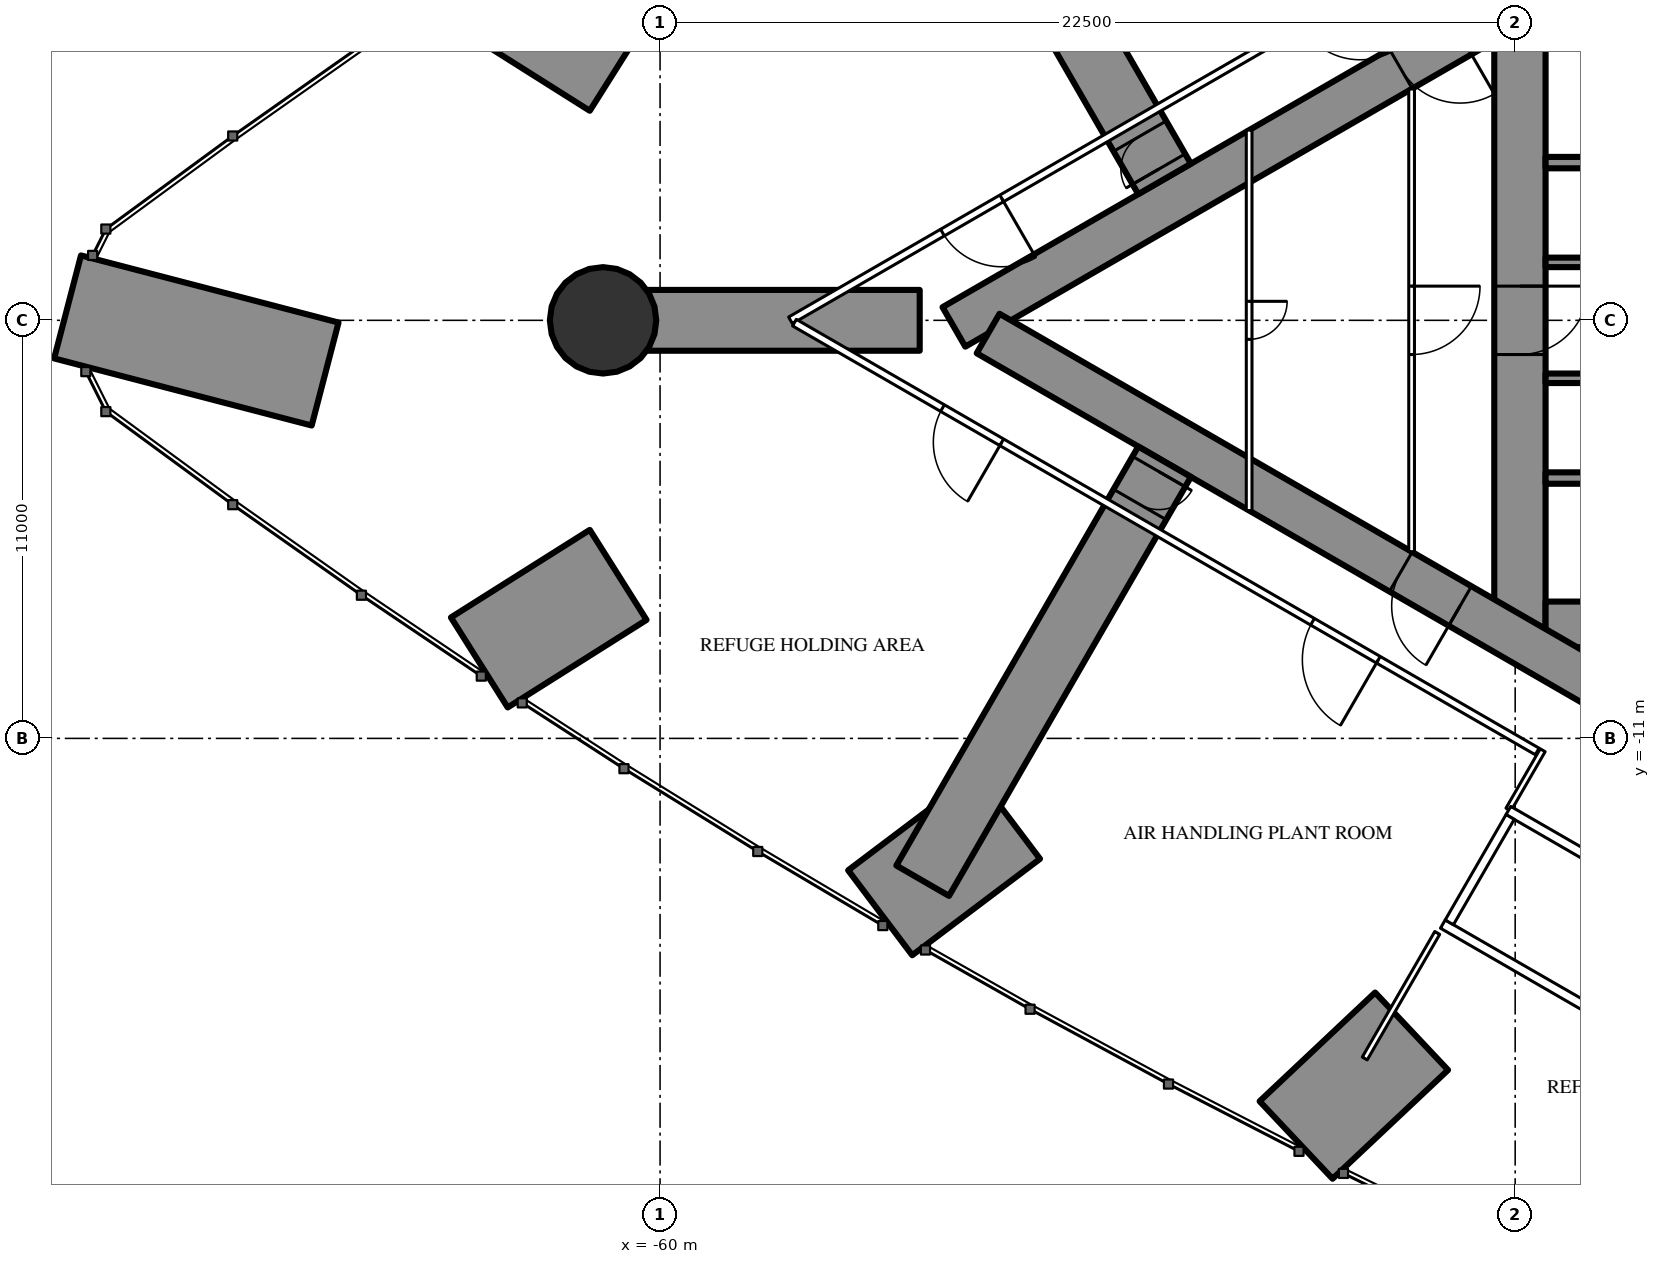
"""IFC4 building model, lengths in metres.
Left out: names, types, materials, properties, quantities, classifications, styles, units other than length and angle.
Written with IfcOpenShell. Run it as: python <this file> out.ifc"""

import sys

from ifc_helpers import new_model, si_unit, direction, frame, frame_2d, origin, origin_2d, place, context, subcontext, project, spatial, rectangle, hollow_circle, extrude, element, fill, save


model = new_model("IFC4")
c1 = context("Model", 3, precision=1e-05, world=origin(), true_north=direction((0.0, 1.0)))
c2 = subcontext(c1, "Body", "Model", "MODEL_VIEW")
j1 = project(units=[si_unit("LENGTHUNIT", "METRE"), si_unit("PLANEANGLEUNIT", "RADIAN")], contexts=[c1])
p1 = place(None, origin())
s1 = spatial("IfcSite", under=j1, at=p1, CompositionType="ELEMENT")
p2 = place(p1, origin())
s2 = spatial("IfcBuilding", under=s1, at=p2, CompositionType="ELEMENT")
p3 = place(p2, frame((0.0, 0.0, 81.0)))
s3 = spatial("IfcBuildingStorey", under=s2, at=p3, CompositionType="ELEMENT", Elevation=81.0)
p4 = place(p3, frame((-75.59, 0.353, 0.0), z_axis=(0.0, 0.0, 1.0), x_axis=(0.967676481034, -0.252194821623, 0.0)))
e1 = element("IfcWall", 1, at=p4, inside=s3, PredefinedType="SHEAR", context=c2, shape_type="SweptSolid", body=[
    extrude(rectangle(XDim=7.003, YDim=2.8, at=frame_2d((3.501, 0.0))), origin(), (0.0, 0.0, 1.0), 6.0),
])
p5 = place(p3, frame((-64.756, -9.002, 0.0), z_axis=(0.0, 0.0, 1.0), x_axis=(0.845851319887, 0.533418732934, 0.0)))
e2 = element("IfcWall", 2, at=p5, inside=s3, PredefinedType="SHEAR", context=c2, shape_type="SweptSolid", body=[
    extrude(rectangle(XDim=4.32, YDim=2.8, at=frame_2d((2.16, 0.0))), origin(), (0.0, 0.0, 1.0), 6.0),
])
p6 = place(p3, frame((-54.208, -15.588, 0.0), z_axis=(0.0, 0.0, 1.0), x_axis=(0.798432065831, 0.602084907843, 0.0)))
e3 = element("IfcWall", 3, at=p6, inside=s3, PredefinedType="SHEAR", context=c2, shape_type="SweptSolid", body=[
    extrude(rectangle(XDim=4.211, YDim=2.8, at=frame_2d((2.106, 0.0))), origin(), (0.0, 0.0, 1.0), 6.0),
])
p7 = place(p3, frame((-43.265, -21.567, 0.0), z_axis=(0.0, 0.0, 1.0), x_axis=(0.728105540353, 0.685465040762, 0.0)))
e4 = element("IfcWall", 4, at=p7, inside=s3, PredefinedType="SHEAR", context=c2, shape_type="SweptSolid", body=[
    extrude(rectangle(XDim=4.174, YDim=2.8, at=frame_2d((2.087, 0.0))), origin(), (0.0, 0.0, 1.0), 6.0),
])
p8 = place(p3, frame((-64.756, 9.002, 0.0), z_axis=(0.0, 0.0, 1.0), x_axis=(0.845851319887, -0.533418732934, 0.0)))
e5 = element("IfcWall", 5, at=p8, inside=s3, PredefinedType="SHEAR", context=c2, shape_type="SweptSolid", body=[
    extrude(rectangle(XDim=4.32, YDim=2.8, at=frame_2d((2.16, 0.0))), origin(), (0.0, 0.0, 1.0), 6.0),
])
p9 = place(p3, frame((-61.5, 0.0, 0.0), z_axis=(0.0, 0.0, 1.0), x_axis=(1.0, 0.0, 0.0)))
e6 = element("IfcColumn", 6, at=p9, inside=s3, PredefinedType="COLUMN", context=c2, shape_type="SweptSolid", body=[
    extrude(hollow_circle(Radius=1.4, WallThickness=0.1, at=origin_2d()), origin(), (0.0, 0.0, 1.0), 6.0),
])
p10 = place(p3, frame((-37.375, 8.6, 0.0), z_axis=(0.0, 0.0, 1.0), x_axis=(0.0, -1.0, 0.0)))
e7 = element("IfcWall", 7, at=p10, inside=s3, PredefinedType="SHEAR", context=c2, shape_type="SweptSolid", body=[
    extrude(rectangle(XDim=17.2, YDim=1.35, at=frame_2d((8.6, 0.0))), origin(), (0.0, 0.0, 1.0), 6.0),
])
p11 = place(p10, frame((7.7, 0.0, 0.0)))
e8 = element("IfcOpeningElement", 8, at=p11, cuts=e7, PredefinedType="OPENING", context=c2, shape_type="SweptSolid", body=[
    extrude(rectangle(XDim=1.8, YDim=2.2, at=frame_2d((0.9, 1.1))), frame((0.0, 0.685, 0.0), z_axis=(0.0, -1.0, 0.0), x_axis=(1.0, 0.0, 0.0)), (0.0, 0.0, 1.0), 1.37),
])
p12 = place(p3, frame((-28.3, -8.0, 0.0), z_axis=(0.0, 0.0, 1.0), x_axis=(-1.0, 0.0, 0.0)))
e9 = element("IfcWall", 9, at=p12, inside=s3, PredefinedType="SHEAR", context=c2, shape_type="SweptSolid", body=[
    extrude(rectangle(XDim=8.4, YDim=1.2, at=frame_2d((4.2, 0.0))), origin(), (0.0, 0.0, 1.0), 6.0),
])
p13 = place(p12, frame((0.25, 0.0, 0.0)))
e10 = element("IfcOpeningElement", 10, at=p13, cuts=e9, PredefinedType="OPENING", context=c2, shape_type="SweptSolid", body=[
    extrude(rectangle(XDim=1.0, YDim=2.2, at=frame_2d((0.5, 1.1))), frame((0.0, 0.61, 0.0), z_axis=(0.0, -1.0, 0.0), x_axis=(1.0, 0.0, 0.0)), (0.0, 0.0, 1.0), 1.22),
])
for number, where, z_axis, x_axis in (
    (11, (-28.3, 4.15, 0.0), (0.0, 0.0, 1.0), (-1.0, 0.0, 0.0)),
    (12, (-28.3, -4.15, 0.0), (0.0, 0.0, 1.0), (-1.0, 0.0, 0.0)),
):
    element("IfcWall", number, at=place(p3, frame(where, z_axis=z_axis, x_axis=x_axis)), inside=s3, PredefinedType="SHEAR", context=c2, shape_type="SweptSolid", body=[
        extrude(rectangle(XDim=8.4, YDim=0.3, at=frame_2d((4.2, 0.0))), origin(), (0.0, 0.0, 1.0), 6.0),
    ])
for number, where, z_axis, x_axis in (
    (13, (-34.25, 1.525, 0.0), (0.0, 0.0, 1.0), (-1.0, 0.0, 0.0)),
    (14, (-34.25, -1.525, 0.0), (0.0, 0.0, 1.0), (-1.0, 0.0, 0.0)),
):
    element("IfcWall", number, at=place(p3, frame(where, z_axis=z_axis, x_axis=x_axis)), inside=s3, PredefinedType="SHEAR", context=c2, shape_type="SweptSolid", body=[
        extrude(rectangle(XDim=2.45, YDim=0.25, at=frame_2d((1.225, 0.0))), origin(), (0.0, 0.0, 1.0), 6.0),
    ])
p14 = place(p3, frame((-27.2, 14.3, 0.0), z_axis=(0.0, 0.0, 1.0), x_axis=(-0.866026593062, -0.499997940104, 0.0)))
e15 = element("IfcWall", 15, at=p14, inside=s3, PredefinedType="SHEAR", context=c2, shape_type="SweptSolid", body=[
    extrude(rectangle(XDim=28.946, YDim=1.2, at=frame_2d((14.473, 0.0))), origin(), (0.0, 0.0, 1.0), 6.0),
])
p15 = place(p14, frame((4.6, 0.0, 0.0)))
e16 = element("IfcOpeningElement", 16, at=p15, cuts=e15, PredefinedType="OPENING", context=c2, shape_type="SweptSolid", body=[
    extrude(rectangle(XDim=1.0, YDim=2.2, at=frame_2d((0.5, 1.1))), frame((0.0, 0.61, 0.0), z_axis=(0.0, -1.0, 0.0), x_axis=(1.0, 0.0, 0.0)), (0.0, 0.0, 1.0), 1.22),
])
p16 = place(p14, frame((13.568, 0.0, 0.0)))
e17 = element("IfcOpeningElement", 17, at=p16, cuts=e15, PredefinedType="OPENING", context=c2, shape_type="SweptSolid", body=[
    extrude(rectangle(XDim=1.8, YDim=2.2, at=frame_2d((0.9, 1.1))), frame((0.0, 0.61, 0.0), z_axis=(0.0, -1.0, 0.0), x_axis=(1.0, 0.0, 0.0)), (0.0, 0.0, 1.0), 1.22),
])
p17 = place(p3, frame((-27.2, -14.3, 0.0), z_axis=(0.0, 0.0, 1.0), x_axis=(-0.866024021859, 0.500002393557, 0.0)))
e18 = element("IfcWall", 18, at=p17, inside=s3, PredefinedType="SHEAR", context=c2, shape_type="SweptSolid", body=[
    extrude(rectangle(XDim=27.907, YDim=1.2, at=frame_2d((13.954, 0.0))), origin(), (0.0, 0.0, 1.0), 6.0),
])
p18 = place(p17, frame((4.6, 0.0, 0.0)))
e19 = element("IfcOpeningElement", 19, at=p18, cuts=e18, PredefinedType="OPENING", context=c2, shape_type="SweptSolid", body=[
    extrude(rectangle(XDim=1.0, YDim=2.2, at=frame_2d((0.5, 1.1))), frame((0.0, 0.61, 0.0), z_axis=(0.0, -1.0, 0.0), x_axis=(1.0, 0.0, 0.0)), (0.0, 0.0, 1.0), 1.22),
])
p19 = place(p17, frame((13.568, 0.0, 0.0)))
e20 = element("IfcOpeningElement", 20, at=p19, cuts=e18, PredefinedType="OPENING", context=c2, shape_type="SweptSolid", body=[
    extrude(rectangle(XDim=1.8, YDim=2.2, at=frame_2d((0.9, 1.1))), frame((0.0, 0.61, 0.0), z_axis=(0.0, -1.0, 0.0), x_axis=(1.0, 0.0, 0.0)), (0.0, 0.0, 1.0), 1.22),
])
p20 = place(p3, frame((-46.725, 3.72, 0.0), z_axis=(0.0, 0.0, 1.0), x_axis=(-0.500000237956, 0.866025266401, 0.0)))
e21 = element("IfcWall", 21, at=p20, inside=s3, PredefinedType="SHEAR", context=c2, shape_type="SweptSolid", body=[
    extrude(rectangle(XDim=12.73, YDim=1.6, at=frame_2d((6.365, 0.0))), origin(), (0.0, 0.0, 1.0), 6.0),
])
p21 = place(p20, frame((0.3, 0.0, 0.0)))
e22 = element("IfcOpeningElement", 22, at=p21, cuts=e21, PredefinedType="OPENING", context=c2, shape_type="SweptSolid", body=[
    extrude(rectangle(XDim=1.0, YDim=2.2, at=frame_2d((0.5, 1.1))), frame((0.0, 0.81, 0.0), z_axis=(0.0, -1.0, 0.0), x_axis=(1.0, 0.0, 0.0)), (0.0, 0.0, 1.0), 1.62),
])
p22 = place(p3, frame((-53.168, 0.0, 0.0), z_axis=(0.0, 0.0, 1.0), x_axis=(-1.0, 0.0, 0.0)))
e23 = element("IfcWall", 23, at=p22, inside=s3, PredefinedType="SHEAR", context=c2, shape_type="SweptSolid", body=[
    extrude(rectangle(XDim=8.332, YDim=1.6, at=frame_2d((4.166, 0.0))), origin(), (0.0, 0.0, 1.0), 6.0),
])
p23 = place(p3, frame((-46.725, -3.72, 0.0), z_axis=(0.0, 0.0, 1.0), x_axis=(-0.500000237956, -0.866025266401, 0.0)))
e24 = element("IfcWall", 24, at=p23, inside=s3, PredefinedType="SHEAR", context=c2, shape_type="SweptSolid", body=[
    extrude(rectangle(XDim=12.73, YDim=1.6, at=frame_2d((6.365, 0.0))), origin(), (0.0, 0.0, 1.0), 6.0),
])
p24 = place(p23, frame((0.3, 0.0, 0.0)))
e25 = element("IfcOpeningElement", 25, at=p24, cuts=e24, PredefinedType="OPENING", context=c2, shape_type="SweptSolid", body=[
    extrude(rectangle(XDim=1.0, YDim=2.2, at=frame_2d((0.5, 1.1))), frame((0.0, 0.81, 0.0), z_axis=(0.0, -1.0, 0.0), x_axis=(1.0, 0.0, 0.0)), (0.0, 0.0, 1.0), 1.62),
])
p25 = place(p3, frame((-39.551, -16.118, 0.0), z_axis=(0.0, 0.0, 1.0), x_axis=(-0.499986503906, -0.866033195618, 0.0)))
e26 = element("IfcWall", 26, at=p25, inside=s3, PredefinedType="PARTITIONING", context=c2, shape_type="SweptSolid", body=[
    extrude(rectangle(XDim=3.815, YDim=0.15, at=frame_2d((1.907, 0.0))), origin(), (0.0, 0.0, 1.0), 5.75),
])
p26 = place(p3, frame((-37.7, 10.894, 0.0), z_axis=(0.0, 0.0, 1.0), x_axis=(-0.866027905338, -0.499995667157, 0.0)))
e27 = element("IfcWall", 27, at=p26, inside=s3, PredefinedType="PARTITIONING", context=c2, shape_type="SweptSolid", body=[
    extrude(rectangle(XDim=21.787, YDim=0.2, at=frame_2d((10.894, 0.0))), origin(), (0.0, 0.0, 1.0), 5.75),
])
p27 = place(p26, frame((15.369, 0.0, 0.0)))
e28 = element("IfcOpeningElement", 28, at=p27, cuts=e27, PredefinedType="OPENING", context=c2, shape_type="SweptSolid", body=[
    extrude(rectangle(XDim=1.8, YDim=2.2, at=frame_2d((0.9, 1.1))), frame((0.0, 0.11, 0.0), z_axis=(0.0, -1.0, 0.0), x_axis=(1.0, 0.0, 0.0)), (0.0, 0.0, 1.0), 0.22),
])
p28 = place(p26, frame((4.476, 0.0, 0.0)))
e29 = element("IfcOpeningElement", 29, at=p28, cuts=e27, PredefinedType="OPENING", context=c2, shape_type="SweptSolid", body=[
    extrude(rectangle(XDim=1.8, YDim=2.2, at=frame_2d((0.9, 1.1))), frame((0.0, 0.11, 0.0), z_axis=(0.0, -1.0, 0.0), x_axis=(1.0, 0.0, 0.0)), (0.0, 0.0, 1.0), 0.22),
])
p29 = place(p3, frame((-36.92, -11.344, 0.0), z_axis=(0.0, 0.0, 1.0), x_axis=(-0.866028313256, 0.499994960614, 0.0)))
e30 = element("IfcWall", 30, at=p29, inside=s3, PredefinedType="PARTITIONING", context=c2, shape_type="SweptSolid", body=[
    extrude(rectangle(XDim=22.568, YDim=0.2, at=frame_2d((11.284, 0.0))), origin(), (0.0, 0.0, 1.0), 5.75),
])
p30 = place(p29, frame((16.27, 0.0, 0.0)))
e31 = element("IfcOpeningElement", 31, at=p30, cuts=e30, PredefinedType="OPENING", context=c2, shape_type="SweptSolid", body=[
    extrude(rectangle(XDim=1.8, YDim=2.2, at=frame_2d((0.9, 1.1))), frame((0.0, 0.11, 0.0), z_axis=(0.0, -1.0, 0.0), x_axis=(1.0, 0.0, 0.0)), (0.0, 0.0, 1.0), 0.22),
])
p31 = place(p29, frame((4.826, 0.0, 0.0)))
e32 = element("IfcOpeningElement", 32, at=p31, cuts=e30, PredefinedType="OPENING", context=c2, shape_type="SweptSolid", body=[
    extrude(rectangle(XDim=2.0, YDim=2.4, at=frame_2d((1.0, 1.2))), frame((0.0, 0.11, 0.0), z_axis=(0.0, -1.0, 0.0), x_axis=(1.0, 0.0, 0.0)), (0.0, 0.0, 1.0), 0.22),
])
p32 = place(p3, frame((-36.776, -11.312, 0.0), z_axis=(0.0, 0.0, 1.0), x_axis=(-0.500038651731, -0.866003087047, 0.0)))
e33 = element("IfcWall", 33, at=p32, inside=s3, PredefinedType="PARTITIONING", context=c2, shape_type="SweptSolid", body=[
    extrude(rectangle(XDim=1.804, YDim=0.15, at=frame_2d((0.902, 0.0))), origin(), (0.0, 0.0, 1.0), 5.75),
])
p33 = place(p3, frame((-40.225, 6.087, 0.0), z_axis=(0.0, 0.0, 1.0), x_axis=(0.0, -1.0, 0.0)))
e34 = element("IfcWall", 34, at=p33, inside=s3, PredefinedType="PARTITIONING", context=c2, shape_type="SweptSolid", body=[
    extrude(rectangle(XDim=12.174, YDim=0.15, at=frame_2d((6.087, 0.0))), origin(), (0.0, 0.0, 1.0), 5.75),
])
p34 = place(p33, frame((5.187, 0.0, 0.0)))
e35 = element("IfcOpeningElement", 35, at=p34, cuts=e34, PredefinedType="OPENING", context=c2, shape_type="SweptSolid", body=[
    extrude(rectangle(XDim=1.8, YDim=2.2, at=frame_2d((0.9, 1.1))), frame((0.0, 0.085, 0.0), z_axis=(0.0, -1.0, 0.0), x_axis=(1.0, 0.0, 0.0)), (0.0, 0.0, 1.0), 0.17),
])
p35 = place(p3, frame((-44.5, 5.005, 0.0), z_axis=(0.0, 0.0, 1.0), x_axis=(0.0, -1.0, 0.0)))
e36 = element("IfcWall", 36, at=p35, inside=s3, PredefinedType="PARTITIONING", context=c2, shape_type="SweptSolid", body=[
    extrude(rectangle(XDim=10.009, YDim=0.15, at=frame_2d((5.005, 0.0))), origin(), (0.0, 0.0, 1.0), 4.45),
])
p36 = place(p35, frame((4.505, 0.0, 0.0)))
e37 = element("IfcOpeningElement", 37, at=p36, cuts=e36, PredefinedType="OPENING", context=c2, shape_type="SweptSolid", body=[
    extrude(rectangle(XDim=1.0, YDim=2.2, at=frame_2d((0.5, 1.1))), frame((0.0, 0.085, 0.0), z_axis=(0.0, -1.0, 0.0), x_axis=(1.0, 0.0, 0.0)), (0.0, 0.0, 1.0), 0.17),
])
p37 = place(p3, frame((-33.696, -15.197, 0.0), z_axis=(0.0, 0.0, 1.0), x_axis=(-0.865976953817, 0.500083908417, 0.0)))
e38 = element("IfcWall", 38, at=p37, inside=s3, PredefinedType="PARTITIONING", context=c2, shape_type="SweptSolid", body=[
    extrude(rectangle(XDim=4.599, YDim=0.25, at=frame_2d((2.3, 0.0))), origin(), (0.0, 0.0, 1.0), 5.75),
])
p38 = place(p3, frame((-35.42, -18.186, 0.0), z_axis=(0.0, 0.0, 1.0), x_axis=(-0.865990227814, 0.50006092162, 0.0)))
e39 = element("IfcWall", 39, at=p38, inside=s3, PredefinedType="PARTITIONING", context=c2, shape_type="SweptSolid", body=[
    extrude(rectangle(XDim=4.6, YDim=0.25, at=frame_2d((2.3, 0.0))), origin(), (0.0, 0.0, 1.0), 5.75),
])
p39 = place(p3, frame((-37.633, -13.068, 0.0), z_axis=(0.0, 0.0, 1.0), x_axis=(-0.499872130319, -0.866099216793, 0.0)))
e40 = element("IfcWall", 40, at=p39, inside=s3, PredefinedType="PARTITIONING", context=c2, shape_type="SweptSolid", body=[
    extrude(rectangle(XDim=3.2, YDim=0.25, at=frame_2d((1.6, 0.0))), origin(), (0.0, 0.0, 1.0), 5.75),
])
p40 = place(p21, origin())
e41 = element("IfcDoor", 41, at=p40, inside=s3, OperationType="SINGLE_SWING_LEFT", PredefinedType="DOOR", context=c2, shape_type="SweptSolid", body=[
    extrude(rectangle(XDim=1.0, YDim=2.2, at=frame_2d((0.5, 1.1))), frame((0.0, 0.025, 0.0), z_axis=(0.0, -1.0, 0.0), x_axis=(1.0, 0.0, 0.0)), (0.0, 0.0, 1.0), 0.05),
])
fill(e22, e41)
p41 = place(p24, origin())
e42 = element("IfcDoor", 42, at=p41, inside=s3, OperationType="SINGLE_SWING_LEFT", PredefinedType="DOOR", context=c2, shape_type="SweptSolid", body=[
    extrude(rectangle(XDim=1.0, YDim=2.2, at=frame_2d((0.5, 1.1))), frame((0.0, 0.025, 0.0), z_axis=(0.0, -1.0, 0.0), x_axis=(1.0, 0.0, 0.0)), (0.0, 0.0, 1.0), 0.05),
])
fill(e25, e42)
p42 = place(p27, origin())
e43 = element("IfcDoor", 43, at=p42, inside=s3, OperationType="DOUBLE_DOOR_SINGLE_SWING", PredefinedType="DOOR", context=c2, shape_type="SweptSolid", body=[
    extrude(rectangle(XDim=1.8, YDim=2.2, at=frame_2d((0.9, 1.1))), frame((0.0, 0.025, 0.0), z_axis=(0.0, -1.0, 0.0), x_axis=(1.0, 0.0, 0.0)), (0.0, 0.0, 1.0), 0.05),
])
fill(e28, e43)
p43 = place(p30, origin())
e44 = element("IfcDoor", 44, at=p43, inside=s3, OperationType="DOUBLE_DOOR_SINGLE_SWING", PredefinedType="DOOR", context=c2, shape_type="SweptSolid", body=[
    extrude(rectangle(XDim=1.8, YDim=2.2, at=frame_2d((0.9, 1.1))), frame((0.0, 0.025, 0.0), z_axis=(0.0, -1.0, 0.0), x_axis=(1.0, 0.0, 0.0)), (0.0, 0.0, 1.0), 0.05),
])
fill(e31, e44)
p44 = place(p31, origin())
e45 = element("IfcDoor", 45, at=p44, inside=s3, OperationType="DOUBLE_DOOR_SINGLE_SWING", PredefinedType="DOOR", context=c2, shape_type="SweptSolid", body=[
    extrude(rectangle(XDim=2.0, YDim=2.4, at=frame_2d((1.0, 1.2))), frame((0.0, 0.025, 0.0), z_axis=(0.0, -1.0, 0.0), x_axis=(1.0, 0.0, 0.0)), (0.0, 0.0, 1.0), 0.05),
])
fill(e32, e45)
p45 = place(p34, origin())
e46 = element("IfcDoor", 46, at=p45, inside=s3, OperationType="DOUBLE_DOOR_SINGLE_SWING", PredefinedType="DOOR", context=c2, shape_type="SweptSolid", body=[
    extrude(rectangle(XDim=1.8, YDim=2.2, at=frame_2d((0.9, 1.1))), frame((0.0, 0.025, 0.0), z_axis=(0.0, -1.0, 0.0), x_axis=(1.0, 0.0, 0.0)), (0.0, 0.0, 1.0), 0.05),
])
fill(e35, e46)
p46 = place(p36, origin())
e47 = element("IfcDoor", 47, at=p46, inside=s3, OperationType="SINGLE_SWING_LEFT", PredefinedType="DOOR", context=c2, shape_type="SweptSolid", body=[
    extrude(rectangle(XDim=1.0, YDim=2.2, at=frame_2d((0.5, 1.1))), frame((0.0, 0.025, 0.0), z_axis=(0.0, -1.0, 0.0), x_axis=(1.0, 0.0, 0.0)), (0.0, 0.0, 1.0), 0.05),
])
fill(e37, e47)
p47 = place(p16, origin())
e48 = element("IfcDoor", 48, at=p47, inside=s3, OperationType="DOUBLE_DOOR_SINGLE_SWING", PredefinedType="DOOR", context=c2, shape_type="SweptSolid", body=[
    extrude(rectangle(XDim=1.8, YDim=2.2, at=frame_2d((0.9, 1.1))), frame((0.0, 0.025, 0.0), z_axis=(0.0, -1.0, 0.0), x_axis=(1.0, 0.0, 0.0)), (0.0, 0.0, 1.0), 0.05),
])
fill(e17, e48)
p48 = place(p19, origin())
e49 = element("IfcDoor", 49, at=p48, inside=s3, OperationType="DOUBLE_DOOR_SINGLE_SWING", PredefinedType="DOOR", context=c2, shape_type="SweptSolid", body=[
    extrude(rectangle(XDim=1.8, YDim=2.2, at=frame_2d((0.9, 1.1))), frame((0.0, 0.025, 0.0), z_axis=(0.0, -1.0, 0.0), x_axis=(1.0, 0.0, 0.0)), (0.0, 0.0, 1.0), 0.05),
])
fill(e20, e49)
p49 = place(p11, origin())
e50 = element("IfcDoor", 50, at=p49, inside=s3, OperationType="DOUBLE_DOOR_SINGLE_SWING", PredefinedType="DOOR", context=c2, shape_type="SweptSolid", body=[
    extrude(rectangle(XDim=1.8, YDim=2.2, at=frame_2d((0.9, 1.1))), frame((0.0, 0.025, 0.0), z_axis=(0.0, -1.0, 0.0), x_axis=(1.0, 0.0, 0.0)), (0.0, 0.0, 1.0), 0.05),
])
fill(e8, e50)
save(model, sys.argv[1])
